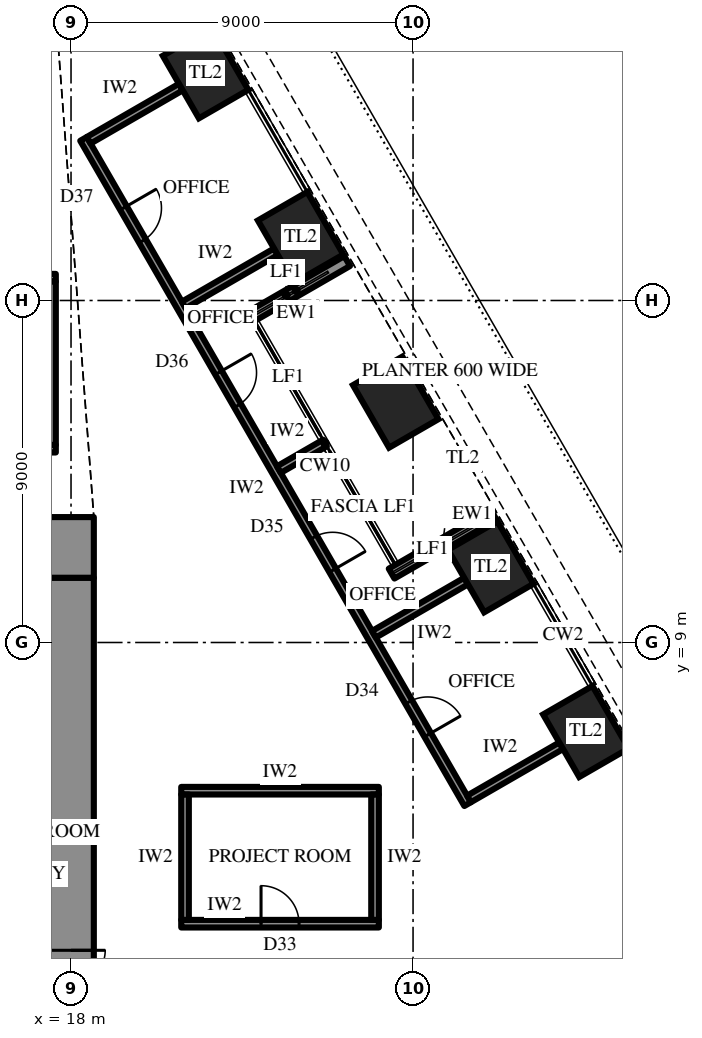
"""IFC4 building model, lengths in metres.
Left out: names, types, materials, properties, quantities, classifications, styles, units other than length and angle.
Written with IfcOpenShell. Run it as: python <this file> out.ifc"""

import sys

from ifc_helpers import new_model, si_unit, direction, frame, frame_2d, origin, origin_2d, place, context, subcontext, project, spatial, rectangle, extrude, element, fill, save


model = new_model("IFC4")
c1 = context("Model", 3, precision=1e-05, world=origin(), true_north=direction((0.0, 1.0)))
c2 = subcontext(c1, "Body", "Model", "MODEL_VIEW")
j1 = project(units=[si_unit("LENGTHUNIT", "METRE"), si_unit("PLANEANGLEUNIT", "RADIAN")], contexts=[c1])
p1 = place(None, origin())
s1 = spatial("IfcSite", under=j1, at=p1, CompositionType="ELEMENT")
p2 = place(p1, origin())
s2 = spatial("IfcBuilding", under=s1, at=p2, CompositionType="ELEMENT")
p3 = place(p2, frame((0.0, 0.0, 199.3)))
s3 = spatial("IfcBuildingStorey", under=s2, at=p3, CompositionType="ELEMENT", Elevation=199.3)
for number, where, z_axis, x_axis in (
    (1, (31.547, 6.658, 0.0), (0.0, 0.0, 1.0), (-0.5, 0.866, 0.0)),
    (2, (29.045, 10.992, 0.0), (0.0, 0.0, 1.0), (-0.5, 0.866, 0.0)),
    (3, (26.544, 15.325, 0.0), (0.0, 0.0, 1.0), (-0.5, 0.866, 0.0)),
    (4, (24.042, 19.658, 0.0), (0.0, 0.0, 1.0), (-0.5, 0.866, 0.0)),
    (5, (21.54, 23.992, 0.0), (0.0, 0.0, 1.0), (-0.5, 0.866, 0.0)),
):
    element("IfcColumn", number, at=place(p3, frame(where, z_axis=z_axis, x_axis=x_axis)), inside=s3, PredefinedType="COLUMN", context=c2, shape_type="SweptSolid", body=[
        extrude(rectangle(XDim=1.9, YDim=1.5, at=origin_2d()), origin(), (0.0, 0.0, 1.0), 4.2),
    ])
p4 = place(p3, frame((-18.6, 11.5, 0.0), z_axis=(0.0, 0.0, 1.0), x_axis=(1.0, 0.0, 0.0)))
e6 = element("IfcWall", 6, at=p4, inside=s3, PredefinedType="SHEAR", context=c2, shape_type="SweptSolid", body=[
    extrude(rectangle(XDim=37.2, YDim=1.6, at=frame_2d((18.6, 0.0))), origin(), (0.0, 0.0, 1.0), 4.2),
])
p5 = place(p4, frame((19.45, 0.0, 0.0)))
e7 = element("IfcOpeningElement", 7, at=p5, cuts=e6, PredefinedType="OPENING", context=c2, shape_type="SweptSolid", body=[
    extrude(rectangle(XDim=0.9, YDim=2.2, at=frame_2d((0.45, 1.1))), frame((0.0, 0.81, 0.0), z_axis=(0.0, -1.0, 0.0), x_axis=(1.0, 0.0, 0.0)), (0.0, 0.0, 1.0), 1.62),
])
p6 = place(p4, frame((22.45, 0.0, 0.0)))
e8 = element("IfcOpeningElement", 8, at=p6, cuts=e6, PredefinedType="OPENING", context=c2, shape_type="SweptSolid", body=[
    extrude(rectangle(XDim=0.9, YDim=2.2, at=frame_2d((0.45, 1.1))), frame((0.0, 0.81, 0.0), z_axis=(0.0, -1.0, 0.0), x_axis=(1.0, 0.0, 0.0)), (0.0, 0.0, 1.0), 1.62),
])
p7 = place(p4, frame((25.5, 0.0, 0.0)))
e9 = element("IfcOpeningElement", 9, at=p7, cuts=e6, PredefinedType="OPENING", context=c2, shape_type="SweptSolid", body=[
    extrude(rectangle(XDim=1.0, YDim=2.2, at=frame_2d((0.5, 1.1))), frame((0.0, 0.81, 0.0), z_axis=(0.0, -1.0, 0.0), x_axis=(1.0, 0.0, 0.0)), (0.0, 0.0, 1.0), 1.62),
])
p8 = place(p4, frame((1.75, 0.0, 0.0)))
e10 = element("IfcOpeningElement", 10, at=p8, cuts=e6, PredefinedType="OPENING", context=c2, shape_type="SweptSolid", body=[
    extrude(rectangle(XDim=0.9, YDim=2.2, at=frame_2d((0.45, 1.1))), frame((0.0, 0.81, 0.0), z_axis=(0.0, -1.0, 0.0), x_axis=(1.0, 0.0, 0.0)), (0.0, 0.0, 1.0), 1.62),
])
p9 = place(p4, frame((4.6, 0.0, 0.0)))
e11 = element("IfcOpeningElement", 11, at=p9, cuts=e6, PredefinedType="OPENING", context=c2, shape_type="SweptSolid", body=[
    extrude(rectangle(XDim=0.9, YDim=2.2, at=frame_2d((0.45, 1.1))), frame((0.0, 0.81, 0.0), z_axis=(0.0, -1.0, 0.0), x_axis=(1.0, 0.0, 0.0)), (0.0, 0.0, 1.0), 1.62),
])
p10 = place(p4, frame((7.85, 0.0, 0.0)))
e12 = element("IfcOpeningElement", 12, at=p10, cuts=e6, PredefinedType="OPENING", context=c2, shape_type="SweptSolid", body=[
    extrude(rectangle(XDim=0.9, YDim=2.2, at=frame_2d((0.45, 1.1))), frame((0.0, 0.81, 0.0), z_axis=(0.0, -1.0, 0.0), x_axis=(1.0, 0.0, 0.0)), (0.0, 0.0, 1.0), 1.62),
])
p11 = place(p4, frame((28.45, 0.0, 0.0)))
e13 = element("IfcOpeningElement", 13, at=p11, cuts=e6, PredefinedType="OPENING", context=c2, shape_type="SweptSolid", body=[
    extrude(rectangle(XDim=0.9, YDim=2.2, at=frame_2d((0.45, 1.1))), frame((0.0, 0.81, 0.0), z_axis=(0.0, -1.0, 0.0), x_axis=(1.0, 0.0, 0.0)), (0.0, 0.0, 1.0), 1.62),
])
p12 = place(p4, frame((31.7, 0.0, 0.0)))
e14 = element("IfcOpeningElement", 14, at=p12, cuts=e6, PredefinedType="OPENING", context=c2, shape_type="SweptSolid", body=[
    extrude(rectangle(XDim=0.9, YDim=2.2, at=frame_2d((0.45, 1.1))), frame((0.0, 0.81, 0.0), z_axis=(0.0, -1.0, 0.0), x_axis=(1.0, 0.0, 0.0)), (0.0, 0.0, 1.0), 1.62),
])
p13 = place(p4, frame((34.55, 0.0, 0.0)))
e15 = element("IfcOpeningElement", 15, at=p13, cuts=e6, PredefinedType="OPENING", context=c2, shape_type="SweptSolid", body=[
    extrude(rectangle(XDim=0.9, YDim=2.2, at=frame_2d((0.45, 1.1))), frame((0.0, 0.81, 0.0), z_axis=(0.0, -1.0, 0.0), x_axis=(1.0, 0.0, 0.0)), (0.0, 0.0, 1.0), 1.62),
])
p14 = place(p3, frame((18.0, -10.7, 0.0), z_axis=(0.0, 0.0, 1.0), x_axis=(0.0, 1.0, 0.0)))
e16 = element("IfcWall", 16, at=p14, inside=s3, PredefinedType="SHEAR", context=c2, shape_type="SweptSolid", body=[
    extrude(rectangle(XDim=21.4, YDim=1.2, at=frame_2d((10.7, 0.0))), origin(), (0.0, 0.0, 1.0), 4.2),
])
p15 = place(p14, frame((9.8, 0.0, 0.0)))
e17 = element("IfcOpeningElement", 17, at=p15, cuts=e16, PredefinedType="OPENING", context=c2, shape_type="SweptSolid", body=[
    extrude(rectangle(XDim=1.8, YDim=2.4, at=frame_2d((0.9, 1.2))), frame((0.0, 0.61, 0.0), z_axis=(0.0, -1.0, 0.0), x_axis=(1.0, 0.0, 0.0)), (0.0, 0.0, 1.0), 1.22),
])
p16 = place(p3, frame((29.12, 12.363, 0.0), z_axis=(0.0, 0.0, 1.0), x_axis=(-0.86602952684, -0.49999285859, 0.0)))
e18 = element("IfcWall", 18, at=p16, inside=s3, PredefinedType="SOLIDWALL", context=c2, shape_type="SweptSolid", body=[
    extrude(rectangle(XDim=3.1, YDim=0.3, at=frame_2d((1.55, 0.0))), origin(), (0.0, 0.0, 1.0), 2.2),
])
p17 = place(p3, frame((25.266, 19.037, 0.0), z_axis=(0.0, 0.0, 1.0), x_axis=(-0.86600983753, -0.500026960575, 0.0)))
e19 = element("IfcWall", 19, at=p17, inside=s3, PredefinedType="SOLIDWALL", context=c2, shape_type="SweptSolid", body=[
    extrude(rectangle(XDim=3.1, YDim=0.3, at=frame_2d((1.55, 0.0))), origin(), (0.0, 0.0, 1.0), 2.2),
])
p18 = place(p3, frame((-17.6, 14.1, 0.0), z_axis=(0.0, 0.0, 1.0), x_axis=(1.0, 0.0, 0.0)))
e20 = element("IfcWall", 20, at=p18, inside=s3, PredefinedType="PARTITIONING", context=c2, shape_type="SweptSolid", body=[
    extrude(rectangle(XDim=35.2, YDim=0.2, at=frame_2d((17.6, 0.0))), origin(), (0.0, 0.0, 1.0), 3.9),
])
p19 = place(p3, frame((-17.6, 18.6, 0.0), z_axis=(0.0, 0.0, 1.0), x_axis=(1.0, 0.0, 0.0)))
e21 = element("IfcWall", 21, at=p19, inside=s3, PredefinedType="PARTITIONING", context=c2, shape_type="SweptSolid", body=[
    extrude(rectangle(XDim=35.2, YDim=0.2, at=frame_2d((17.6, 0.0))), origin(), (0.0, 0.0, 1.0), 3.9),
])
p20 = place(p19, frame((9.7, 0.0, 0.0)))
e22 = element("IfcOpeningElement", 22, at=p20, cuts=e21, PredefinedType="OPENING", context=c2, shape_type="SweptSolid", body=[
    extrude(rectangle(XDim=1.8, YDim=2.4, at=frame_2d((0.9, 1.2))), frame((0.0, 0.11, 0.0), z_axis=(0.0, -1.0, 0.0), x_axis=(1.0, 0.0, 0.0)), (0.0, 0.0, 1.0), 0.22),
])
p21 = place(p19, frame((27.2, 0.0, 0.0)))
e23 = element("IfcOpeningElement", 23, at=p21, cuts=e21, PredefinedType="OPENING", context=c2, shape_type="SweptSolid", body=[
    extrude(rectangle(XDim=1.8, YDim=2.4, at=frame_2d((0.9, 1.2))), frame((0.0, 0.11, 0.0), z_axis=(0.0, -1.0, 0.0), x_axis=(1.0, 0.0, 0.0)), (0.0, 0.0, 1.0), 0.22),
])
p22 = place(p3, frame((17.5, 14.2, 0.0), z_axis=(0.0, 0.0, 1.0), x_axis=(0.0, 1.0, 0.0)))
e24 = element("IfcWall", 24, at=p22, inside=s3, PredefinedType="PARTITIONING", context=c2, shape_type="SweptSolid", body=[
    extrude(rectangle(XDim=4.3, YDim=0.2, at=frame_2d((2.15, 0.0))), origin(), (0.0, 0.0, 1.0), 3.9),
])
p23 = place(p3, frame((28.436, 4.747, 0.0), z_axis=(0.0, 0.0, 1.0), x_axis=(-0.499995666571, 0.866027905677, 0.0)))
e25 = element("IfcWall", 25, at=p23, inside=s3, PredefinedType="PARTITIONING", context=c2, shape_type="SweptSolid", body=[
    extrude(rectangle(XDim=20.215, YDim=0.2, at=frame_2d((10.107, 0.0))), origin(), (0.0, 0.0, 1.0), 3.9),
])
p24 = place(p23, frame((2.102, 0.0, 0.0)))
e26 = element("IfcOpeningElement", 26, at=p24, cuts=e25, PredefinedType="OPENING", context=c2, shape_type="SweptSolid", body=[
    extrude(rectangle(XDim=1.0, YDim=2.2, at=frame_2d((0.5, 1.1))), frame((0.0, 0.11, 0.0), z_axis=(0.0, -1.0, 0.0), x_axis=(1.0, 0.0, 0.0)), (0.0, 0.0, 1.0), 0.22),
])
p25 = place(p23, frame((7.105, 0.0, 0.0)))
e27 = element("IfcOpeningElement", 27, at=p25, cuts=e25, PredefinedType="OPENING", context=c2, shape_type="SweptSolid", body=[
    extrude(rectangle(XDim=1.0, YDim=2.2, at=frame_2d((0.5, 1.1))), frame((0.0, 0.11, 0.0), z_axis=(0.0, -1.0, 0.0), x_axis=(1.0, 0.0, 0.0)), (0.0, 0.0, 1.0), 0.22),
])
p26 = place(p23, frame((12.109, 0.0, 0.0)))
e28 = element("IfcOpeningElement", 28, at=p26, cuts=e25, PredefinedType="OPENING", context=c2, shape_type="SweptSolid", body=[
    extrude(rectangle(XDim=1.0, YDim=2.2, at=frame_2d((0.5, 1.1))), frame((0.0, 0.11, 0.0), z_axis=(0.0, -1.0, 0.0), x_axis=(1.0, 0.0, 0.0)), (0.0, 0.0, 1.0), 0.22),
])
p27 = place(p23, frame((17.113, 0.0, 0.0)))
e29 = element("IfcOpeningElement", 29, at=p27, cuts=e25, PredefinedType="OPENING", context=c2, shape_type="SweptSolid", body=[
    extrude(rectangle(XDim=1.0, YDim=2.2, at=frame_2d((0.5, 1.1))), frame((0.0, 0.11, 0.0), z_axis=(0.0, -1.0, 0.0), x_axis=(1.0, 0.0, 0.0)), (0.0, 0.0, 1.0), 0.22),
])
p28 = place(p3, frame((28.473, 4.883, 0.0), z_axis=(0.0, 0.0, 1.0), x_axis=(0.866018616679, 0.500011755427, 0.0)))
e30 = element("IfcWall", 30, at=p28, inside=s3, PredefinedType="PARTITIONING", context=c2, shape_type="SweptSolid", body=[
    extrude(rectangle(XDim=2.8, YDim=0.2, at=frame_2d((1.4, 0.0))), origin(), (0.0, 0.0, 1.0), 2.892),
])
p29 = place(p3, frame((25.971, 9.217, 0.0), z_axis=(0.0, 0.0, 1.0), x_axis=(0.865996816683, 0.500049511043, 0.0)))
e31 = element("IfcWall", 31, at=p29, inside=s3, PredefinedType="PARTITIONING", context=c2, shape_type="SweptSolid", body=[
    extrude(rectangle(XDim=2.8, YDim=0.2, at=frame_2d((1.4, 0.0))), origin(), (0.0, 0.0, 1.0), 2.892),
])
p30 = place(p3, frame((23.469, 13.55, 0.0), z_axis=(0.0, 0.0, 1.0), x_axis=(0.866057911062, 0.499943691516, 0.0)))
e32 = element("IfcWall", 32, at=p30, inside=s3, PredefinedType="PARTITIONING", context=c2, shape_type="SweptSolid", body=[
    extrude(rectangle(XDim=1.401, YDim=0.2, at=frame_2d((0.701, 0.0))), origin(), (0.0, 0.0, 1.0), 3.9),
])
for number, where, z_axis, x_axis in (
    (33, (20.968, 17.883, 0.0), (0.0, 0.0, 1.0), (0.866, 0.5, 0.0)),
    (34, (18.466, 22.217, 0.0), (0.0, 0.0, 1.0), (0.866, 0.5, 0.0)),
):
    element("IfcWall", number, at=place(p3, frame(where, z_axis=z_axis, x_axis=x_axis)), inside=s3, PredefinedType="PARTITIONING", context=c2, shape_type="SweptSolid", body=[
        extrude(rectangle(XDim=2.8, YDim=0.2, at=frame_2d((1.4, 0.0))), origin(), (0.0, 0.0, 1.0), 2.892),
    ])
p31 = place(p3, frame((20.9, 1.6, 0.0), z_axis=(0.0, 0.0, 1.0), x_axis=(1.0, 0.0, 0.0)))
e35 = element("IfcWall", 35, at=p31, inside=s3, PredefinedType="PARTITIONING", context=c2, shape_type="SweptSolid", body=[
    extrude(rectangle(XDim=5.2, YDim=0.2, at=frame_2d((2.6, 0.0))), origin(), (0.0, 0.0, 1.0), 3.9),
])
p32 = place(p31, frame((2.1, 0.0, 0.0)))
e36 = element("IfcOpeningElement", 36, at=p32, cuts=e35, PredefinedType="OPENING", context=c2, shape_type="SweptSolid", body=[
    extrude(rectangle(XDim=1.0, YDim=2.2, at=frame_2d((0.5, 1.1))), frame((0.0, 0.11, 0.0), z_axis=(0.0, -1.0, 0.0), x_axis=(1.0, 0.0, 0.0)), (0.0, 0.0, 1.0), 0.22),
])
p33 = place(p3, frame((20.9, 5.1, 0.0), z_axis=(0.0, 0.0, 1.0), x_axis=(1.0, 0.0, 0.0)))
e37 = element("IfcWall", 37, at=p33, inside=s3, PredefinedType="PARTITIONING", context=c2, shape_type="SweptSolid", body=[
    extrude(rectangle(XDim=5.2, YDim=0.2, at=frame_2d((2.6, 0.0))), origin(), (0.0, 0.0, 1.0), 3.9),
])
for number, where, z_axis, x_axis in (
    (38, (21.0, 1.7, 0.0), (0.0, 0.0, 1.0), (0.0, 1.0, 0.0)),
    (39, (26.0, 1.7, 0.0), (0.0, 0.0, 1.0), (0.0, 1.0, 0.0)),
):
    element("IfcWall", number, at=place(p3, frame(where, z_axis=z_axis, x_axis=x_axis)), inside=s3, PredefinedType="PARTITIONING", context=c2, shape_type="SweptSolid", body=[
        extrude(rectangle(XDim=3.3, YDim=0.2, at=frame_2d((1.65, 0.0))), origin(), (0.0, 0.0, 1.0), 3.9),
    ])
p34 = place(p15, frame((1.8, 0.0, 0.0), z_axis=(0.0, 0.0, 1.0), x_axis=(-1.0, 0.0, 0.0)))
e40 = element("IfcDoor", 40, at=p34, inside=s3, OperationType="DOUBLE_DOOR_SINGLE_SWING", PredefinedType="DOOR", context=c2, shape_type="SweptSolid", body=[
    extrude(rectangle(XDim=1.8, YDim=2.4, at=frame_2d((0.9, 1.2))), frame((0.0, 0.025, 0.0), z_axis=(0.0, -1.0, 0.0), x_axis=(1.0, 0.0, 0.0)), (0.0, 0.0, 1.0), 0.05),
])
fill(e17, e40)
p35 = place(p24, frame((1.0, 0.0, 0.0), z_axis=(0.0, 0.0, 1.0), x_axis=(-1.0, 0.0, 0.0)))
e41 = element("IfcDoor", 41, at=p35, inside=s3, OperationType="SINGLE_SWING_LEFT", PredefinedType="DOOR", context=c2, shape_type="SweptSolid", body=[
    extrude(rectangle(XDim=1.0, YDim=2.2, at=frame_2d((0.5, 1.1))), frame((0.0, 0.025, 0.0), z_axis=(0.0, -1.0, 0.0), x_axis=(1.0, 0.0, 0.0)), (0.0, 0.0, 1.0), 0.05),
])
fill(e26, e41)
p36 = place(p25, frame((1.0, 0.0, 0.0), z_axis=(0.0, 0.0, 1.0), x_axis=(-1.0, 0.0, 0.0)))
e42 = element("IfcDoor", 42, at=p36, inside=s3, OperationType="SINGLE_SWING_LEFT", PredefinedType="DOOR", context=c2, shape_type="SweptSolid", body=[
    extrude(rectangle(XDim=1.0, YDim=2.2, at=frame_2d((0.5, 1.1))), frame((0.0, 0.025, 0.0), z_axis=(0.0, -1.0, 0.0), x_axis=(1.0, 0.0, 0.0)), (0.0, 0.0, 1.0), 0.05),
])
fill(e27, e42)
p37 = place(p26, frame((1.0, 0.0, 0.0), z_axis=(0.0, 0.0, 1.0), x_axis=(-1.0, 0.0, 0.0)))
e43 = element("IfcDoor", 43, at=p37, inside=s3, OperationType="SINGLE_SWING_RIGHT", PredefinedType="DOOR", context=c2, shape_type="SweptSolid", body=[
    extrude(rectangle(XDim=1.0, YDim=2.2, at=frame_2d((0.5, 1.1))), frame((0.0, 0.025, 0.0), z_axis=(0.0, -1.0, 0.0), x_axis=(1.0, 0.0, 0.0)), (0.0, 0.0, 1.0), 0.05),
])
fill(e28, e43)
p38 = place(p27, frame((1.0, 0.0, 0.0), z_axis=(0.0, 0.0, 1.0), x_axis=(-1.0, 0.0, 0.0)))
e44 = element("IfcDoor", 44, at=p38, inside=s3, OperationType="SINGLE_SWING_RIGHT", PredefinedType="DOOR", context=c2, shape_type="SweptSolid", body=[
    extrude(rectangle(XDim=1.0, YDim=2.2, at=frame_2d((0.5, 1.1))), frame((0.0, 0.025, 0.0), z_axis=(0.0, -1.0, 0.0), x_axis=(1.0, 0.0, 0.0)), (0.0, 0.0, 1.0), 0.05),
])
fill(e29, e44)
p39 = place(p32, origin())
e45 = element("IfcDoor", 45, at=p39, inside=s3, OperationType="SINGLE_SWING_RIGHT", PredefinedType="DOOR", context=c2, shape_type="SweptSolid", body=[
    extrude(rectangle(XDim=1.0, YDim=2.2, at=frame_2d((0.5, 1.1))), frame((0.0, 0.025, 0.0), z_axis=(0.0, -1.0, 0.0), x_axis=(1.0, 0.0, 0.0)), (0.0, 0.0, 1.0), 0.05),
])
fill(e36, e45)
save(model, sys.argv[1])
